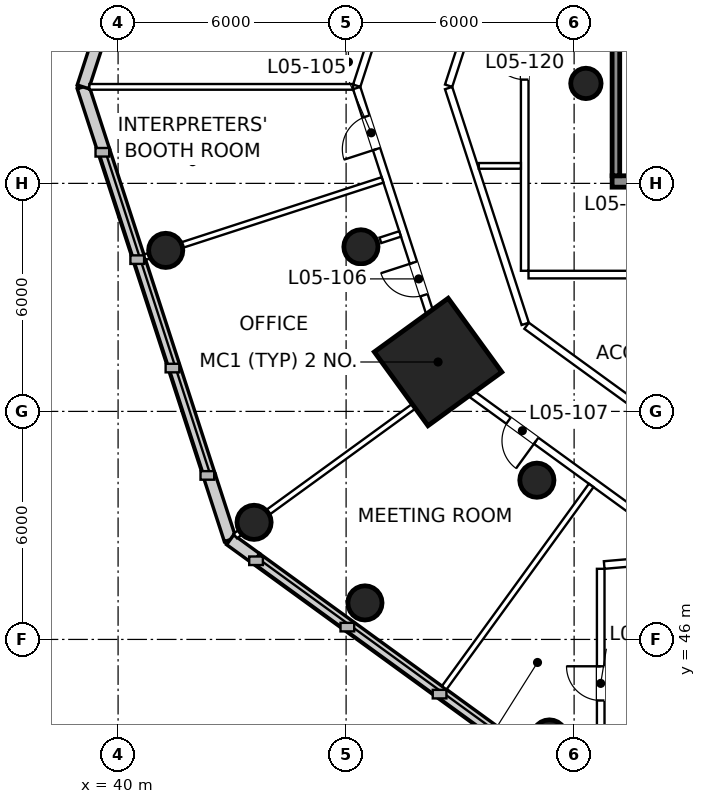
"""IFC4 building model, lengths in metres.
Left out: names, types, materials, properties, quantities, classifications, styles, units other than length and angle.
Written with IfcOpenShell. Run it as: python <this file> out.ifc"""

import sys

from ifc_helpers import new_model, si_unit, direction, frame, frame_2d, origin, origin_2d, place, context, subcontext, project, spatial, rectangle, circle, extrude, element, fill, save


model = new_model("IFC4")
c1 = context("Model", 3, precision=1e-05, world=origin(), true_north=direction((0.0, 1.0)))
c2 = subcontext(c1, "Body", "Model", "MODEL_VIEW")
j1 = project(units=[si_unit("LENGTHUNIT", "METRE"), si_unit("PLANEANGLEUNIT", "RADIAN")], contexts=[c1])
p1 = place(None, origin())
s1 = spatial("IfcSite", under=j1, at=p1, CompositionType="ELEMENT")
p2 = place(p1, origin())
s2 = spatial("IfcBuilding", under=s1, at=p2, CompositionType="ELEMENT")
p3 = place(p2, frame((0.0, 0.0, 34.0)))
s3 = spatial("IfcBuildingStorey", under=s2, at=p3, CompositionType="ELEMENT", Elevation=34.0)
p4 = place(p3, frame((46.39, 56.33, 0.0), z_axis=(0.0, 0.0, 1.0), x_axis=(1.0, 0.0, 0.0)))
e1 = element("IfcColumn", 1, at=p4, inside=s3, PredefinedType="COLUMN", context=c2, shape_type="SweptSolid", body=[
    extrude(circle(Radius=0.45, at=origin_2d()), origin(), (0.0, 0.0, 1.0), 5.0),
])
p5 = place(p3, frame((48.42, 53.3, 0.0), z_axis=(0.0, 0.0, 1.0), x_axis=(-0.809016994375, -0.587785252292, 0.0)))
e2 = element("IfcColumn", 2, at=p5, inside=s3, PredefinedType="COLUMN", context=c2, shape_type="SweptSolid", body=[
    extrude(rectangle(XDim=2.4, YDim=2.4, at=origin_2d()), origin(), (0.0, 0.0, 1.0), 5.0),
])
p6 = place(p3, frame((51.02, 50.19, 0.0), z_axis=(0.0, 0.0, 1.0), x_axis=(1.0, 0.0, 0.0)))
e3 = element("IfcColumn", 3, at=p6, inside=s3, PredefinedType="COLUMN", context=c2, shape_type="SweptSolid", body=[
    extrude(circle(Radius=0.45, at=origin_2d()), origin(), (0.0, 0.0, 1.0), 5.0),
])
p7 = place(p3, frame((52.31, 60.63, 0.0), z_axis=(0.0, 0.0, 1.0), x_axis=(1.0, 0.0, 0.0)))
e4 = element("IfcColumn", 4, at=p7, inside=s3, PredefinedType="COLUMN", context=c2, shape_type="SweptSolid", body=[
    extrude(circle(Radius=0.4, at=origin_2d()), origin(), (0.0, 0.0, 1.0), 5.0),
])
for number, where, z_axis, x_axis in (
    (5, (41.253, 56.237, 0.0), (0.0, 0.0, 1.0), (1.0, 0.0, 0.0)),
    (6, (43.578, 49.081, 0.0), (0.0, 0.0, 1.0), (1.0, 0.0, 0.0)),
    (7, (46.496, 46.961, 0.0), (0.0, 0.0, 1.0), (1.0, 0.0, 0.0)),
    (8, (51.35, 43.434, 0.0), (0.0, 0.0, 1.0), (1.0, 0.0, 0.0)),
):
    element("IfcColumn", number, at=place(p3, frame(where, z_axis=z_axis, x_axis=x_axis)), inside=s3, PredefinedType="COLUMN", context=c2, shape_type="SweptSolid", body=[
        extrude(circle(Radius=0.45, at=origin_2d()), origin(), (0.0, 0.0, 1.0), 5.0),
    ])
p8 = place(p3, frame((39.077, 60.539, 0.0), z_axis=(0.0, 0.0, 1.0), x_axis=(0.309036002497, -0.951050339972, 0.0)))
e9 = element("IfcWall", 9, at=p8, inside=s3, PredefinedType="SOLIDWALL", context=c2, shape_type="SweptSolid", body=[
    extrude(rectangle(XDim=1.764, YDim=0.32, at=frame_2d((0.882, 0.0))), origin(), (0.0, 0.0, 1.0), 4.6),
])
p9 = place(p3, frame((39.622, 58.861, 0.0), z_axis=(0.0, 0.0, 1.0), x_axis=(0.309000197986, -0.951061973609, 0.0)))
e10 = element("IfcWall", 10, at=p9, inside=s3, PredefinedType="SOLIDWALL", context=c2, shape_type="SweptSolid", body=[
    extrude(rectangle(XDim=9.0, YDim=0.32, at=frame_2d((4.5, 0.0))), origin(), (0.0, 0.0, 1.0), 0.9),
])
p10 = place(p3, frame((42.403, 50.302, 0.0), z_axis=(0.0, 0.0, 1.0), x_axis=(0.308995332064, -0.951063554534, 0.0)))
e11 = element("IfcWall", 11, at=p10, inside=s3, PredefinedType="SOLIDWALL", context=c2, shape_type="SweptSolid", body=[
    extrude(rectangle(XDim=1.764, YDim=0.32, at=frame_2d((0.882, 0.0))), origin(), (0.0, 0.0, 1.0), 4.6),
])
p11 = place(p3, frame((42.948, 48.624, 0.0), z_axis=(0.0, 0.0, 1.0), x_axis=(0.809172006105, -0.587571837766, 0.0)))
e12 = element("IfcWall", 12, at=p11, inside=s3, PredefinedType="SOLIDWALL", context=c2, shape_type="SweptSolid", body=[
    extrude(rectangle(XDim=0.847, YDim=0.32, at=frame_2d((0.424, 0.0))), origin(), (0.0, 0.0, 1.0), 4.6),
])
p12 = place(p3, frame((43.634, 48.126, 0.0), z_axis=(0.0, 0.0, 1.0), x_axis=(0.808999938455, -0.587808727036, 0.0)))
e13 = element("IfcWall", 13, at=p12, inside=s3, PredefinedType="SOLIDWALL", context=c2, shape_type="SweptSolid", body=[
    extrude(rectangle(XDim=9.0, YDim=0.32, at=frame_2d((4.5, 0.0))), origin(), (0.0, 0.0, 1.0), 0.9),
])
p13 = place(p3, frame((47.017, 84.976, 0.0), z_axis=(0.0, 0.0, 1.0), x_axis=(-0.309015385889, -0.951057038922, 0.0)))
e14 = element("IfcWall", 14, at=p13, inside=s3, PredefinedType="SOLIDWALL", context=c2, shape_type="SweptSolid", body=[
    extrude(rectangle(XDim=25.694, YDim=0.32, at=frame_2d((12.847, 0.0))), origin(), (0.0, 0.0, 1.0), 4.6),
])
p14 = place(p13, frame((1.447, 0.0, 0.9)))
e15 = element("IfcOpeningElement", 15, at=p14, cuts=e14, PredefinedType="OPENING", context=c2, shape_type="SweptSolid", body=[
    extrude(rectangle(XDim=1.8, YDim=2.1, at=frame_2d((0.9, 1.05))), frame((0.0, 0.17, 0.0), z_axis=(0.0, -1.0, 0.0), x_axis=(1.0, 0.0, 0.0)), (0.0, 0.0, 1.0), 0.34),
])
p15 = place(p13, frame((4.447, 0.0, 0.9)))
e16 = element("IfcOpeningElement", 16, at=p15, cuts=e14, PredefinedType="OPENING", context=c2, shape_type="SweptSolid", body=[
    extrude(rectangle(XDim=1.8, YDim=2.1, at=frame_2d((0.9, 1.05))), frame((0.0, 0.17, 0.0), z_axis=(0.0, -1.0, 0.0), x_axis=(1.0, 0.0, 0.0)), (0.0, 0.0, 1.0), 0.34),
])
p16 = place(p13, frame((7.447, 0.0, 0.9)))
e17 = element("IfcOpeningElement", 17, at=p16, cuts=e14, PredefinedType="OPENING", context=c2, shape_type="SweptSolid", body=[
    extrude(rectangle(XDim=1.8, YDim=2.1, at=frame_2d((0.9, 1.05))), frame((0.0, 0.17, 0.0), z_axis=(0.0, -1.0, 0.0), x_axis=(1.0, 0.0, 0.0)), (0.0, 0.0, 1.0), 0.34),
])
p17 = place(p13, frame((10.447, 0.0, 0.9)))
e18 = element("IfcOpeningElement", 18, at=p17, cuts=e14, PredefinedType="OPENING", context=c2, shape_type="SweptSolid", body=[
    extrude(rectangle(XDim=1.8, YDim=2.1, at=frame_2d((0.9, 1.05))), frame((0.0, 0.17, 0.0), z_axis=(0.0, -1.0, 0.0), x_axis=(1.0, 0.0, 0.0)), (0.0, 0.0, 1.0), 0.34),
])
p18 = place(p13, frame((13.447, 0.0, 0.9)))
e19 = element("IfcOpeningElement", 19, at=p18, cuts=e14, PredefinedType="OPENING", context=c2, shape_type="SweptSolid", body=[
    extrude(rectangle(XDim=1.8, YDim=2.1, at=frame_2d((0.9, 1.05))), frame((0.0, 0.17, 0.0), z_axis=(0.0, -1.0, 0.0), x_axis=(1.0, 0.0, 0.0)), (0.0, 0.0, 1.0), 0.34),
])
p19 = place(p13, frame((16.447, 0.0, 0.9)))
e20 = element("IfcOpeningElement", 20, at=p19, cuts=e14, PredefinedType="OPENING", context=c2, shape_type="SweptSolid", body=[
    extrude(rectangle(XDim=1.8, YDim=2.1, at=frame_2d((0.9, 1.05))), frame((0.0, 0.17, 0.0), z_axis=(0.0, -1.0, 0.0), x_axis=(1.0, 0.0, 0.0)), (0.0, 0.0, 1.0), 0.34),
])
p20 = place(p13, frame((19.447, 0.0, 0.9)))
e21 = element("IfcOpeningElement", 21, at=p20, cuts=e14, PredefinedType="OPENING", context=c2, shape_type="SweptSolid", body=[
    extrude(rectangle(XDim=1.8, YDim=2.1, at=frame_2d((0.9, 1.05))), frame((0.0, 0.17, 0.0), z_axis=(0.0, -1.0, 0.0), x_axis=(1.0, 0.0, 0.0)), (0.0, 0.0, 1.0), 0.34),
])
p21 = place(p13, frame((22.447, 0.0, 0.9)))
e22 = element("IfcOpeningElement", 22, at=p21, cuts=e14, PredefinedType="OPENING", context=c2, shape_type="SweptSolid", body=[
    extrude(rectangle(XDim=1.8, YDim=2.1, at=frame_2d((0.9, 1.05))), frame((0.0, 0.17, 0.0), z_axis=(0.0, -1.0, 0.0), x_axis=(1.0, 0.0, 0.0)), (0.0, 0.0, 1.0), 0.34),
])
p22 = place(p3, frame((53.0, 58.05, 0.0), z_axis=(0.0, 0.0, 1.0), x_axis=(1.0, 0.0, 0.0)))
e23 = element("IfcWall", 23, at=p22, inside=s3, PredefinedType="SHEAR", context=c2, shape_type="SweptSolid", body=[
    extrude(rectangle(XDim=11.9, YDim=0.3, at=frame_2d((5.95, 0.0))), origin(), (0.0, 0.0, 1.0), 5.0),
])
p23 = place(p22, frame((1.45, 0.0, 0.0)))
e24 = element("IfcOpeningElement", 24, at=p23, cuts=e23, PredefinedType="OPENING", context=c2, shape_type="SweptSolid", body=[
    extrude(rectangle(XDim=1.1, YDim=2.1, at=frame_2d((0.55, 1.05))), frame((0.0, 0.16, 0.0), z_axis=(0.0, -1.0, 0.0), x_axis=(1.0, 0.0, 0.0)), (0.0, 0.0, 1.0), 0.32),
])
p24 = place(p3, frame((53.1, 58.2, 0.0), z_axis=(0.0, 0.0, 1.0), x_axis=(0.0, 1.0, 0.0)))
e25 = element("IfcWall", 25, at=p24, inside=s3, PredefinedType="SHEAR", context=c2, shape_type="SweptSolid", body=[
    extrude(rectangle(XDim=3.35, YDim=0.2, at=frame_2d((1.675, 0.0))), origin(), (0.0, 0.0, 1.0), 5.0),
])
p25 = place(p3, frame((52.7, 41.737, 0.0), z_axis=(0.0, 0.0, 1.0), x_axis=(0.0, 1.0, 0.0)))
e26 = element("IfcWall", 26, at=p25, inside=s3, PredefinedType="PARTITIONING", context=c2, shape_type="SweptSolid", body=[
    extrude(rectangle(XDim=6.122, YDim=0.2, at=frame_2d((3.061, 0.0))), origin(), (0.0, 0.0, 1.0), 3.9),
])
p26 = place(p25, frame((2.656, 0.0, 0.0)))
e27 = element("IfcOpeningElement", 27, at=p26, cuts=e26, PredefinedType="OPENING", context=c2, shape_type="SweptSolid", body=[
    extrude(rectangle(XDim=0.9, YDim=2.1, at=frame_2d((0.45, 1.05))), frame((0.0, 0.11, 0.0), z_axis=(0.0, -1.0, 0.0), x_axis=(1.0, 0.0, 0.0)), (0.0, 0.0, 1.0), 0.22),
])
p27 = place(p3, frame((52.792, 47.958, 0.0), z_axis=(0.0, 0.0, 1.0), x_axis=(0.996286600035, 0.086098841978, 0.0)))
e28 = element("IfcWall", 28, at=p27, inside=s3, PredefinedType="PARTITIONING", context=c2, shape_type="SweptSolid", body=[
    extrude(rectangle(XDim=2.164, YDim=0.2, at=frame_2d((1.082, 0.0))), origin(), (0.0, 0.0, 1.0), 4.1),
])
p28 = place(p3, frame((54.997, 48.325, 0.0), z_axis=(0.0, 0.0, 1.0), x_axis=(-0.809019601086, 0.587781664446, 0.0)))
e29 = element("IfcWall", 29, at=p28, inside=s3, PredefinedType="PARTITIONING", context=c2, shape_type="SweptSolid", body=[
    extrude(rectangle(XDim=7.668, YDim=0.2, at=frame_2d((3.834, 0.0))), origin(), (0.0, 0.0, 1.0), 4.1),
])
p29 = place(p28, frame((4.938, 0.0, 0.0)))
e30 = element("IfcOpeningElement", 30, at=p29, cuts=e29, PredefinedType="OPENING", context=c2, shape_type="SweptSolid", body=[
    extrude(rectangle(XDim=0.9, YDim=2.1, at=frame_2d((0.45, 1.05))), frame((0.0, 0.11, 0.0), z_axis=(0.0, -1.0, 0.0), x_axis=(1.0, 0.0, 0.0)), (0.0, 0.0, 1.0), 0.22),
])
p30 = place(p3, frame((48.757, 52.882, 0.0), z_axis=(0.0, 0.0, 1.0), x_axis=(-0.309030308026, 0.951052190325, 0.0)))
e31 = element("IfcWall", 31, at=p30, inside=s3, PredefinedType="PARTITIONING", context=c2, shape_type="SweptSolid", body=[
    extrude(rectangle(XDim=8.019, YDim=0.2, at=frame_2d((4.009, 0.0))), origin(), (0.0, 0.0, 1.0), 3.9),
])
p31 = place(p30, frame((6.33, 0.0, 0.0)))
e32 = element("IfcOpeningElement", 32, at=p31, cuts=e31, PredefinedType="OPENING", context=c2, shape_type="SweptSolid", body=[
    extrude(rectangle(XDim=0.9, YDim=2.1, at=frame_2d((0.45, 1.05))), frame((0.0, 0.11, 0.0), z_axis=(0.0, -1.0, 0.0), x_axis=(1.0, 0.0, 0.0)), (0.0, 0.0, 1.0), 0.22),
])
p32 = place(p30, frame((2.288, 0.0, 0.0)))
e33 = element("IfcOpeningElement", 33, at=p32, cuts=e31, PredefinedType="OPENING", context=c2, shape_type="SweptSolid", body=[
    extrude(rectangle(XDim=0.9, YDim=2.1, at=frame_2d((0.45, 1.05))), frame((0.0, 0.11, 0.0), z_axis=(0.0, -1.0, 0.0), x_axis=(1.0, 0.0, 0.0)), (0.0, 0.0, 1.0), 0.22),
])
p33 = place(p3, frame((46.279, 60.57, 0.0), z_axis=(0.0, 0.0, 1.0), x_axis=(0.309020575415, 0.951055352737, 0.0)))
e34 = element("IfcWall", 34, at=p33, inside=s3, PredefinedType="PARTITIONING", context=c2, shape_type="SweptSolid", body=[
    extrude(rectangle(XDim=21.409, YDim=0.2, at=frame_2d((10.704, 0.0))), origin(), (0.0, 0.0, 1.0), 3.9),
])
p34 = place(p33, frame((20.005, 0.0, 0.0)))
e35 = element("IfcOpeningElement", 35, at=p34, cuts=e34, PredefinedType="OPENING", context=c2, shape_type="SweptSolid", body=[
    extrude(rectangle(XDim=0.8, YDim=2.1, at=frame_2d((0.4, 1.05))), frame((0.0, 0.11, 0.0), z_axis=(0.0, -1.0, 0.0), x_axis=(1.0, 0.0, 0.0)), (0.0, 0.0, 1.0), 0.22),
])
p35 = place(p33, frame((16.142, 0.0, 0.0)))
e36 = element("IfcOpeningElement", 36, at=p35, cuts=e34, PredefinedType="OPENING", context=c2, shape_type="SweptSolid", body=[
    extrude(rectangle(XDim=0.9, YDim=2.1, at=frame_2d((0.45, 1.05))), frame((0.0, 0.11, 0.0), z_axis=(0.0, -1.0, 0.0), x_axis=(1.0, 0.0, 0.0)), (0.0, 0.0, 1.0), 0.22),
])
p36 = place(p33, frame((10.142, 0.0, 0.0)))
e37 = element("IfcOpeningElement", 37, at=p36, cuts=e34, PredefinedType="OPENING", context=c2, shape_type="SweptSolid", body=[
    extrude(rectangle(XDim=0.9, YDim=2.1, at=frame_2d((0.45, 1.05))), frame((0.0, 0.11, 0.0), z_axis=(0.0, -1.0, 0.0), x_axis=(1.0, 0.0, 0.0)), (0.0, 0.0, 1.0), 0.22),
])
p37 = place(p33, frame((3.33, 0.0, 0.0)))
e38 = element("IfcOpeningElement", 38, at=p37, cuts=e34, PredefinedType="OPENING", context=c2, shape_type="SweptSolid", body=[
    extrude(rectangle(XDim=0.9, YDim=2.1, at=frame_2d((0.45, 1.05))), frame((0.0, 0.11, 0.0), z_axis=(0.0, -1.0, 0.0), x_axis=(1.0, 0.0, 0.0)), (0.0, 0.0, 1.0), 0.22),
])
p38 = place(p3, frame((54.566, 78.631, 0.0), z_axis=(0.0, 0.0, 1.0), x_axis=(-0.309021827521, -0.951054945897, 0.0)))
e39 = element("IfcWall", 39, at=p38, inside=s3, PredefinedType="PARTITIONING", context=c2, shape_type="SweptSolid", body=[
    extrude(rectangle(XDim=18.99, YDim=0.2, at=frame_2d((9.495, 0.0))), origin(), (0.0, 0.0, 1.0), 4.6),
])
p39 = place(p3, frame((48.698, 60.508, 0.0), z_axis=(0.0, 0.0, 1.0), x_axis=(0.308999759659, -0.951062116021, 0.0)))
e40 = element("IfcWall", 40, at=p39, inside=s3, PredefinedType="PARTITIONING", context=c2, shape_type="SweptSolid", body=[
    extrude(rectangle(XDim=6.524, YDim=0.2, at=frame_2d((3.262, 0.0))), origin(), (0.0, 0.0, 1.0), 4.6),
])
p40 = place(p3, frame((50.75, 54.254, 0.0), z_axis=(0.0, 0.0, 1.0), x_axis=(0.809010498572, -0.587794192894, 0.0)))
e41 = element("IfcWall", 41, at=p40, inside=s3, PredefinedType="PARTITIONING", context=c2, shape_type="SweptSolid", body=[
    extrude(rectangle(XDim=10.692, YDim=0.2, at=frame_2d((5.346, 0.0))), origin(), (0.0, 0.0, 1.0), 4.6),
])
p41 = place(p40, frame((3.62, 0.0, 0.0)))
e42 = element("IfcOpeningElement", 42, at=p41, cuts=e41, PredefinedType="OPENING", context=c2, shape_type="SweptSolid", body=[
    extrude(rectangle(XDim=0.9, YDim=2.1, at=frame_2d((0.45, 1.05))), frame((0.0, 0.11, 0.0), z_axis=(0.0, -1.0, 0.0), x_axis=(1.0, 0.0, 0.0)), (0.0, 0.0, 1.0), 0.22),
])
p42 = place(p3, frame((67.1, 55.6, 0.0), z_axis=(0.0, 0.0, 1.0), x_axis=(-1.0, 0.0, 0.0)))
e43 = element("IfcWall", 43, at=p42, inside=s3, PredefinedType="PARTITIONING", context=c2, shape_type="SweptSolid", body=[
    extrude(rectangle(XDim=16.3, YDim=0.2, at=frame_2d((8.15, 0.0))), origin(), (0.0, 0.0, 1.0), 4.0),
])
p43 = place(p42, frame((4.37, 0.0, 0.0)))
e44 = element("IfcOpeningElement", 44, at=p43, cuts=e43, PredefinedType="OPENING", context=c2, shape_type="SweptSolid", body=[
    extrude(rectangle(XDim=0.9, YDim=2.1, at=frame_2d((0.45, 1.05))), frame((0.0, 0.11, 0.0), z_axis=(0.0, -1.0, 0.0), x_axis=(1.0, 0.0, 0.0)), (0.0, 0.0, 1.0), 0.22),
])
p44 = place(p3, frame((50.7, 55.7, 0.0), z_axis=(0.0, 0.0, 1.0), x_axis=(0.0, 1.0, 0.0)))
e45 = element("IfcWall", 45, at=p44, inside=s3, PredefinedType="PARTITIONING", context=c2, shape_type="SweptSolid", body=[
    extrude(rectangle(XDim=8.35, YDim=0.2, at=frame_2d((4.175, 0.0))), origin(), (0.0, 0.0, 1.0), 4.6),
])
p45 = place(p44, frame((5.03, 0.0, 0.0)))
e46 = element("IfcOpeningElement", 46, at=p45, cuts=e45, PredefinedType="OPENING", context=c2, shape_type="SweptSolid", body=[
    extrude(rectangle(XDim=0.9, YDim=2.1, at=frame_2d((0.45, 1.05))), frame((0.0, 0.11, 0.0), z_axis=(0.0, -1.0, 0.0), x_axis=(1.0, 0.0, 0.0)), (0.0, 0.0, 1.0), 0.22),
])
p46 = place(p3, frame((39.245, 60.539, 0.0), z_axis=(0.0, 0.0, 1.0), x_axis=(1.0, 0.0, 0.0)))
e47 = element("IfcWall", 47, at=p46, inside=s3, PredefinedType="PARTITIONING", context=c2, shape_type="SweptSolid", body=[
    extrude(rectangle(XDim=6.939, YDim=0.15, at=frame_2d((3.469, 0.0))), origin(), (0.0, 0.0, 1.0), 3.9),
])
p47 = place(p3, frame((43.085, 48.723, 0.0), z_axis=(0.0, 0.0, 1.0), x_axis=(0.809006827345, 0.587799245754, 0.0)))
e48 = element("IfcWall", 48, at=p47, inside=s3, PredefinedType="PARTITIONING", context=c2, shape_type="SweptSolid", body=[
    extrude(rectangle(XDim=6.939, YDim=0.15, at=frame_2d((3.469, 0.0))), origin(), (0.0, 0.0, 1.0), 4.6),
])
for number, where, z_axis, x_axis in (
    (49, (40.701, 56.058, 0.0), (0.0, 0.0, 1.0), (0.951, 0.309, 0.0)),
    (50, (48.582, 44.729, 0.0), (0.0, 0.0, 1.0), (0.588, 0.809, 0.0)),
):
    element("IfcWall", number, at=place(p3, frame(where, z_axis=z_axis, x_axis=x_axis)), inside=s3, PredefinedType="PARTITIONING", context=c2, shape_type="SweptSolid", body=[
        extrude(rectangle(XDim=6.58, YDim=0.15, at=frame_2d((3.29, 0.0))), origin(), (0.0, 0.0, 1.0), 3.9),
    ])
p48 = place(p3, frame((49.492, 58.46, 0.0), z_axis=(0.0, 0.0, 1.0), x_axis=(1.0, 0.0, 0.0)))
e51 = element("IfcWall", 51, at=p48, inside=s3, PredefinedType="PARTITIONING", context=c2, shape_type="SweptSolid", body=[
    extrude(rectangle(XDim=1.108, YDim=0.15, at=frame_2d((0.554, 0.0))), origin(), (0.0, 0.0, 1.0), 4.6),
])
p49 = place(p3, frame((46.902, 56.501, 0.0), z_axis=(0.0, 0.0, 1.0), x_axis=(0.951027493825, 0.309106302085, 0.0)))
e52 = element("IfcWall", 52, at=p49, inside=s3, PredefinedType="PARTITIONING", context=c2, shape_type="SweptSolid", body=[
    extrude(rectangle(XDim=0.546, YDim=0.15, at=frame_2d((0.273, 0.0))), origin(), (0.0, 0.0, 1.0), 4.6),
])
p50 = place(p31, origin())
e53 = element("IfcDoor", 53, at=p50, inside=s3, OperationType="SINGLE_SWING_LEFT", PredefinedType="DOOR", context=c2, shape_type="SweptSolid", body=[
    extrude(rectangle(XDim=0.9, YDim=2.1, at=frame_2d((0.45, 1.05))), frame((0.0, 0.025, 0.0), z_axis=(0.0, -1.0, 0.0), x_axis=(1.0, 0.0, 0.0)), (0.0, 0.0, 1.0), 0.05),
])
fill(e32, e53)
p51 = place(p32, origin())
e54 = element("IfcDoor", 54, at=p51, inside=s3, OperationType="SINGLE_SWING_RIGHT", PredefinedType="DOOR", context=c2, shape_type="SweptSolid", body=[
    extrude(rectangle(XDim=0.9, YDim=2.1, at=frame_2d((0.45, 1.05))), frame((0.0, 0.025, 0.0), z_axis=(0.0, -1.0, 0.0), x_axis=(1.0, 0.0, 0.0)), (0.0, 0.0, 1.0), 0.05),
])
fill(e33, e54)
p52 = place(p29, origin())
e55 = element("IfcDoor", 55, at=p52, inside=s3, OperationType="SINGLE_SWING_LEFT", PredefinedType="DOOR", context=c2, shape_type="SweptSolid", body=[
    extrude(rectangle(XDim=0.9, YDim=2.1, at=frame_2d((0.45, 1.05))), frame((0.0, 0.025, 0.0), z_axis=(0.0, -1.0, 0.0), x_axis=(1.0, 0.0, 0.0)), (0.0, 0.0, 1.0), 0.05),
])
fill(e30, e55)
p53 = place(p26, origin())
e56 = element("IfcDoor", 56, at=p53, inside=s3, OperationType="SINGLE_SWING_RIGHT", PredefinedType="DOOR", context=c2, shape_type="SweptSolid", body=[
    extrude(rectangle(XDim=0.9, YDim=2.1, at=frame_2d((0.45, 1.05))), frame((0.0, 0.025, 0.0), z_axis=(0.0, -1.0, 0.0), x_axis=(1.0, 0.0, 0.0)), (0.0, 0.0, 1.0), 0.05),
])
fill(e27, e56)
p54 = place(p45, origin())
e57 = element("IfcDoor", 57, at=p54, inside=s3, OperationType="SINGLE_SWING_RIGHT", PredefinedType="DOOR", context=c2, shape_type="SweptSolid", body=[
    extrude(rectangle(XDim=0.9, YDim=2.1, at=frame_2d((0.45, 1.05))), frame((0.0, 0.025, 0.0), z_axis=(0.0, -1.0, 0.0), x_axis=(1.0, 0.0, 0.0)), (0.0, 0.0, 1.0), 0.05),
])
fill(e46, e57)
save(model, sys.argv[1])
